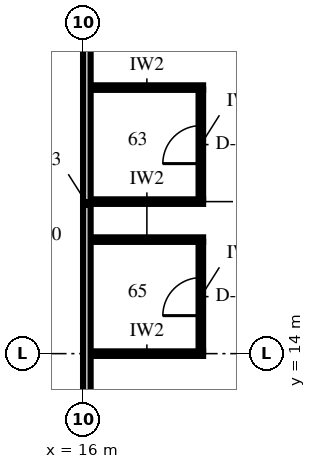
"""IFC4 building model, lengths in metres.
Left out: names, types, materials, properties, quantities, classifications, styles, units other than length and angle.
Written with IfcOpenShell. Run it as: python <this file> out.ifc"""

import sys

from ifc_helpers import new_model, si_unit, direction, frame, frame_2d, origin, place, context, subcontext, project, spatial, rectangle, extrude, element, fill, save


model = new_model("IFC4")
c1 = context("Model", 3, precision=1e-05, world=origin(), true_north=direction((0.0, 1.0)))
c2 = subcontext(c1, "Body", "Model", "MODEL_VIEW")
j1 = project(units=[si_unit("LENGTHUNIT", "METRE"), si_unit("PLANEANGLEUNIT", "RADIAN")], contexts=[c1])
p1 = place(None, origin())
s1 = spatial("IfcSite", under=j1, at=p1, CompositionType="ELEMENT")
p2 = place(p1, origin())
s2 = spatial("IfcBuilding", under=s1, at=p2, CompositionType="ELEMENT")
p3 = place(p2, frame((0.0, 0.0, 214.0)))
s3 = spatial("IfcBuildingStorey", under=s2, at=p3, CompositionType="ELEMENT", Elevation=214.0)
for number, where, z_axis, x_axis in (
    (1, (16.2, 14.0, 0.0), (0.0, 0.0, 1.0), (1.0, 0.0, 0.0)),
    (2, (16.2, 17.0, 0.0), (0.0, 0.0, 1.0), (1.0, 0.0, 0.0)),
):
    element("IfcWall", number, at=place(p3, frame(where, z_axis=z_axis, x_axis=x_axis)), inside=s3, PredefinedType="PARTITIONING", context=c2, shape_type="SweptSolid", body=[
        extrude(rectangle(XDim=2.96, YDim=0.12, at=frame_2d((1.48, 0.0))), origin(), (0.0, 0.0, 1.0), 3.85),
    ])
for number, where, z_axis, x_axis in (
    (3, (16.2, 18.0, 0.0), (0.0, 0.0, 1.0), (1.0, 0.0, 0.0)),
    (4, (16.2, 21.0, 0.0), (0.0, 0.0, 1.0), (1.0, 0.0, 0.0)),
):
    element("IfcWall", number, at=place(p3, frame(where, z_axis=z_axis, x_axis=x_axis)), inside=s3, PredefinedType="PARTITIONING", context=c2, shape_type="SweptSolid", body=[
        extrude(rectangle(XDim=2.96, YDim=0.12, at=frame_2d((1.48, 0.0))), origin(), (0.0, 0.0, 1.0), 3.25),
    ])
p4 = place(p3, frame((16.1, 9.9, 0.0), z_axis=(0.0, 0.0, 1.0), x_axis=(0.0, 1.0, 0.0)))
e5 = element("IfcWall", 5, at=p4, inside=s3, PredefinedType="PARTITIONING", context=c2, shape_type="SweptSolid", body=[
    extrude(rectangle(XDim=16.1, YDim=0.2, at=frame_2d((8.05, 0.0))), origin(), (0.0, 0.0, 1.0), 3.25),
])
p5 = place(p4, frame((14.6, 0.0, 0.0)))
e6 = element("IfcOpeningElement", 6, at=p5, cuts=e5, PredefinedType="OPENING", context=c2, shape_type="SweptSolid", body=[
    extrude(rectangle(XDim=1.2, YDim=2.4, at=frame_2d((0.6, 1.2))), frame((0.0, 0.115, 0.0), z_axis=(0.0, -1.0, 0.0), x_axis=(1.0, 0.0, 0.0)), (0.0, 0.0, 1.0), 0.23),
])
p6 = place(p3, frame((19.1, 14.06, 0.0), z_axis=(0.0, 0.0, 1.0), x_axis=(0.0, 1.0, 0.0)))
e7 = element("IfcWall", 7, at=p6, inside=s3, PredefinedType="PARTITIONING", context=c2, shape_type="SweptSolid", body=[
    extrude(rectangle(XDim=2.88, YDim=0.12, at=frame_2d((1.44, 0.0))), origin(), (0.0, 0.0, 1.0), 3.25),
])
p7 = place(p6, frame((0.94, 0.0, 0.0)))
e8 = element("IfcOpeningElement", 8, at=p7, cuts=e7, PredefinedType="OPENING", context=c2, shape_type="SweptSolid", body=[
    extrude(rectangle(XDim=1.0, YDim=2.4, at=frame_2d((0.5, 1.2))), frame((0.0, 0.075, 0.0), z_axis=(0.0, -1.0, 0.0), x_axis=(1.0, 0.0, 0.0)), (0.0, 0.0, 1.0), 0.15),
])
p8 = place(p3, frame((19.1, 18.06, 0.0), z_axis=(0.0, 0.0, 1.0), x_axis=(0.0, 1.0, 0.0)))
e9 = element("IfcWall", 9, at=p8, inside=s3, PredefinedType="PARTITIONING", context=c2, shape_type="SweptSolid", body=[
    extrude(rectangle(XDim=2.88, YDim=0.12, at=frame_2d((1.44, 0.0))), origin(), (0.0, 0.0, 1.0), 3.85),
])
p9 = place(p8, frame((0.94, 0.0, 0.0)))
e10 = element("IfcOpeningElement", 10, at=p9, cuts=e9, PredefinedType="OPENING", context=c2, shape_type="SweptSolid", body=[
    extrude(rectangle(XDim=1.0, YDim=2.4, at=frame_2d((0.5, 1.2))), frame((0.0, 0.075, 0.0), z_axis=(0.0, -1.0, 0.0), x_axis=(1.0, 0.0, 0.0)), (0.0, 0.0, 1.0), 0.15),
])
p10 = place(p7, origin())
e11 = element("IfcDoor", 11, at=p10, inside=s3, OperationType="SINGLE_SWING_RIGHT", PredefinedType="DOOR", context=c2, shape_type="SweptSolid", body=[
    extrude(rectangle(XDim=1.0, YDim=2.4, at=frame_2d((0.5, 1.2))), frame((0.0, 0.06, 0.0), z_axis=(0.0, -1.0, 0.0), x_axis=(1.0, 0.0, 0.0)), (0.0, 0.0, 1.0), 0.12),
])
fill(e8, e11)
p11 = place(p9, origin())
e12 = element("IfcDoor", 12, at=p11, inside=s3, OperationType="SINGLE_SWING_RIGHT", PredefinedType="DOOR", context=c2, shape_type="SweptSolid", body=[
    extrude(rectangle(XDim=1.0, YDim=2.4, at=frame_2d((0.5, 1.2))), frame((0.0, 0.06, 0.0), z_axis=(0.0, -1.0, 0.0), x_axis=(1.0, 0.0, 0.0)), (0.0, 0.0, 1.0), 0.12),
])
fill(e10, e12)
save(model, sys.argv[1])
